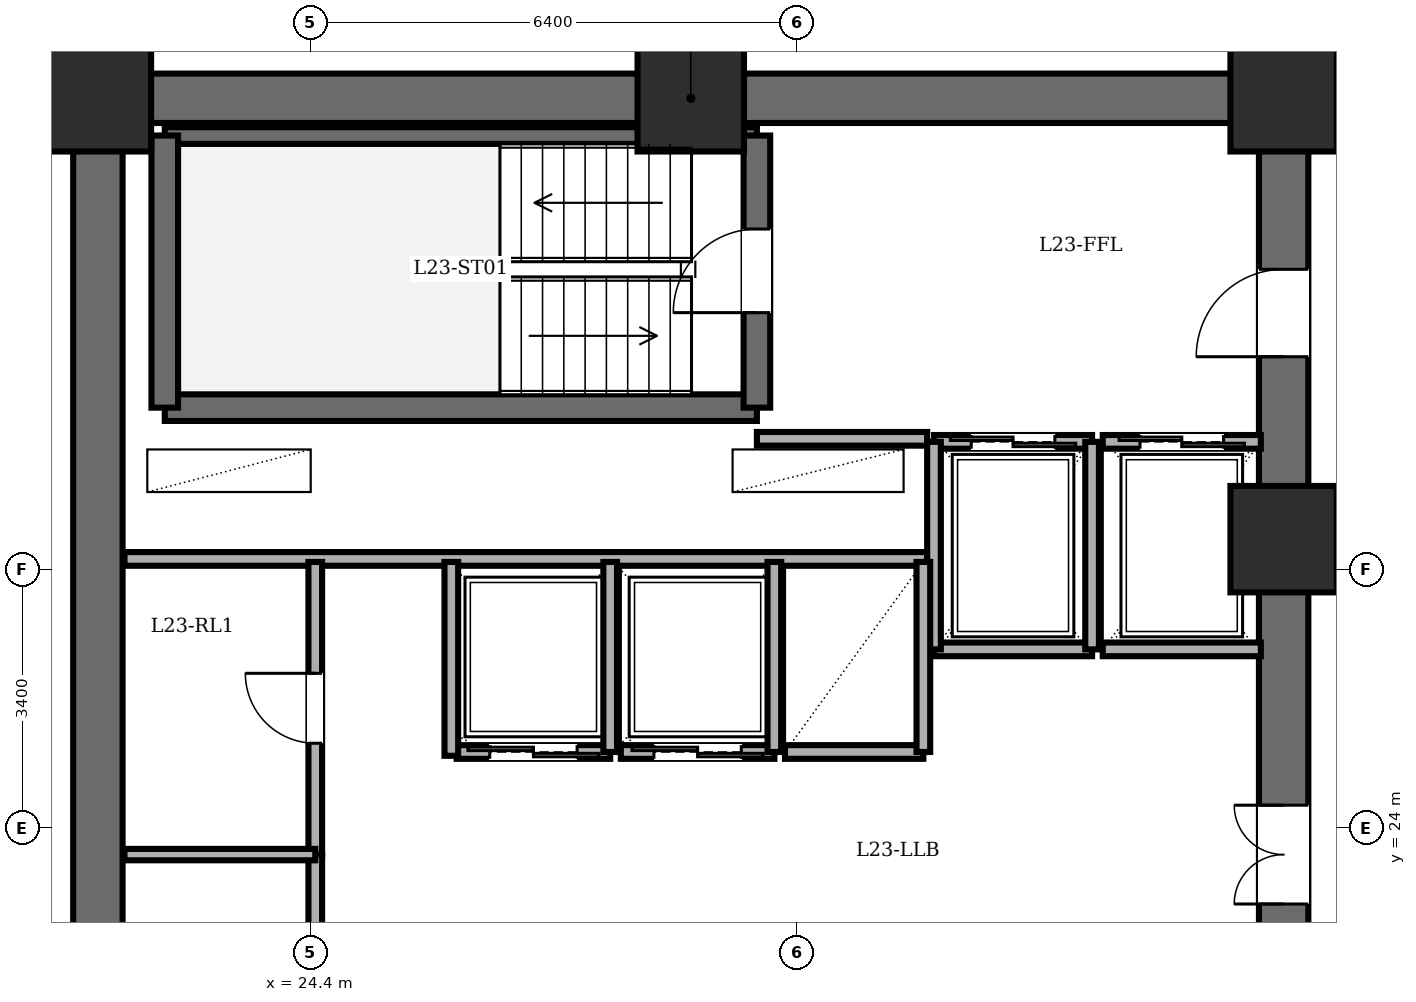
"""IFC4 building model, lengths in metres.
Left out: names, types, materials, properties, quantities, classifications, styles, units other than length and angle.
Written with IfcOpenShell. Run it as: python <this file> out.ifc"""

import sys

from ifc_helpers import new_model, si_unit, direction, frame, frame_2d, origin, origin_2d, place, context, subcontext, project, spatial, rectangle, extrude, element, fill, save


model = new_model("IFC4")
c1 = context("Model", 3, precision=1e-05, world=origin(), true_north=direction((0.0, 1.0)))
c2 = subcontext(c1, "Body", "Model", "MODEL_VIEW")
j1 = project(units=[si_unit("LENGTHUNIT", "METRE"), si_unit("PLANEANGLEUNIT", "RADIAN")], contexts=[c1])
p1 = place(None, origin())
s1 = spatial("IfcSite", under=j1, at=p1, CompositionType="ELEMENT")
p2 = place(p1, origin())
s2 = spatial("IfcBuilding", under=s1, at=p2, CompositionType="ELEMENT")
p3 = place(p2, frame((0.0, 0.0, 89.9)))
s3 = spatial("IfcBuildingStorey", under=s2, at=p3, CompositionType="ELEMENT", Elevation=89.9)
for number, where, z_axis, x_axis in (
    (1, (37.2, 27.8, 0.0), (0.0, 0.0, 1.0), (1.0, 0.0, 0.0)),
    (2, (37.2, 33.6, 0.0), (0.0, 0.0, 1.0), (1.0, 0.0, 0.0)),
    (3, (29.4, 33.6, 0.0), (0.0, 0.0, 1.0), (1.0, 0.0, 0.0)),
    (4, (21.6, 33.6, 0.0), (0.0, 0.0, 1.0), (1.0, 0.0, 0.0)),
):
    element("IfcColumn", number, at=place(p3, frame(where, z_axis=z_axis, x_axis=x_axis)), inside=s3, PredefinedType="COLUMN", context=c2, shape_type="SweptSolid", body=[
        extrude(rectangle(XDim=1.4, YDim=1.4, at=origin_2d()), origin(), (0.0, 0.0, 1.0), 3.6),
    ])
p4 = place(p3, frame((21.6, 14.4, 0.0), z_axis=(0.0, 0.0, 1.0), x_axis=(0.0, 1.0, 0.0)))
e5 = element("IfcWall", 5, at=p4, inside=s3, PredefinedType="SHEAR", context=c2, shape_type="SweptSolid", body=[
    extrude(rectangle(XDim=19.2, YDim=0.65, at=frame_2d((9.6, 0.0))), origin(), (0.0, 0.0, 1.0), 3.4),
])
p5 = place(p3, frame((21.6, 33.6, 0.0), z_axis=(0.0, 0.0, 1.0), x_axis=(1.0, 0.0, 0.0)))
e6 = element("IfcWall", 6, at=p5, inside=s3, PredefinedType="SHEAR", context=c2, shape_type="SweptSolid", body=[
    extrude(rectangle(XDim=15.6, YDim=0.65, at=frame_2d((7.8, 0.0))), origin(), (0.0, 0.0, 1.0), 3.4),
])
p6 = place(p3, frame((37.2, 14.4, 0.0), z_axis=(0.0, 0.0, 1.0), x_axis=(0.0, 1.0, 0.0)))
e7 = element("IfcWall", 7, at=p6, inside=s3, PredefinedType="SHEAR", context=c2, shape_type="SweptSolid", body=[
    extrude(rectangle(XDim=19.2, YDim=0.65, at=frame_2d((9.6, 0.0))), origin(), (0.0, 0.0, 1.0), 3.4),
])
p7 = place(p6, frame((15.8, 0.0, 0.0)))
e8 = element("IfcOpeningElement", 8, at=p7, cuts=e7, PredefinedType="OPENING", context=c2, shape_type="SweptSolid", body=[
    extrude(rectangle(XDim=1.15, YDim=2.15, at=frame_2d((0.575, 1.075))), frame((0.0, 0.335, 0.0), z_axis=(0.0, -1.0, 0.0), x_axis=(1.0, 0.0, 0.0)), (0.0, 0.0, 1.0), 0.67),
])
p8 = place(p6, frame((3.6, 0.0, 0.0)))
e9 = element("IfcOpeningElement", 9, at=p8, cuts=e7, PredefinedType="OPENING", context=c2, shape_type="SweptSolid", body=[
    extrude(rectangle(XDim=1.1, YDim=2.15, at=frame_2d((0.55, 1.075))), frame((0.0, 0.335, 0.0), z_axis=(0.0, -1.0, 0.0), x_axis=(1.0, 0.0, 0.0)), (0.0, 0.0, 1.0), 0.67),
])
p9 = place(p6, frame((8.6, 0.0, 0.0)))
e10 = element("IfcOpeningElement", 10, at=p9, cuts=e7, PredefinedType="OPENING", context=c2, shape_type="SweptSolid", body=[
    extrude(rectangle(XDim=1.3, YDim=2.2, at=frame_2d((0.65, 1.1))), frame((0.0, 0.335, 0.0), z_axis=(0.0, -1.0, 0.0), x_axis=(1.0, 0.0, 0.0)), (0.0, 0.0, 1.0), 0.67),
])
p10 = place(p3, frame((22.48, 29.53, 0.0), z_axis=(0.0, 0.0, 1.0), x_axis=(1.0, 0.0, 0.0)))
e11 = element("IfcWall", 11, at=p10, inside=s3, PredefinedType="SOLIDWALL", context=c2, shape_type="SweptSolid", body=[
    extrude(rectangle(XDim=7.79, YDim=0.35, at=frame_2d((3.895, 0.0))), origin(), (0.0, 0.0, 1.0), 3.4),
])
p11 = place(p3, frame((22.48, 33.11, 0.0), z_axis=(0.0, 0.0, 1.0), x_axis=(1.0, 0.0, 0.0)))
e12 = element("IfcWall", 12, at=p11, inside=s3, PredefinedType="PARTITIONING", context=c2, shape_type="SweptSolid", body=[
    extrude(rectangle(XDim=7.79, YDim=0.22, at=frame_2d((3.895, 0.0))), origin(), (0.0, 0.0, 1.0), 3.4),
])
p12 = place(p3, frame((22.48, 29.53, 0.0), z_axis=(0.0, 0.0, 1.0), x_axis=(0.0, 1.0, 0.0)))
e13 = element("IfcWall", 13, at=p12, inside=s3, PredefinedType="SOLIDWALL", context=c2, shape_type="SweptSolid", body=[
    extrude(rectangle(XDim=3.58, YDim=0.35, at=frame_2d((1.79, 0.0))), origin(), (0.0, 0.0, 1.0), 3.4),
])
p13 = place(p3, frame((30.27, 29.53, 0.0), z_axis=(0.0, 0.0, 1.0), x_axis=(0.0, 1.0, 0.0)))
e14 = element("IfcWall", 14, at=p13, inside=s3, PredefinedType="SOLIDWALL", context=c2, shape_type="SweptSolid", body=[
    extrude(rectangle(XDim=3.58, YDim=0.35, at=frame_2d((1.79, 0.0))), origin(), (0.0, 0.0, 1.0), 3.4),
])
p14 = place(p13, frame((1.25, 0.0, 0.0)))
e15 = element("IfcOpeningElement", 15, at=p14, cuts=e14, PredefinedType="OPENING", context=c2, shape_type="SweptSolid", body=[
    extrude(rectangle(XDim=1.1, YDim=2.15, at=frame_2d((0.55, 1.075))), frame((0.0, 0.185, 0.0), z_axis=(0.0, -1.0, 0.0), x_axis=(1.0, 0.0, 0.0)), (0.0, 0.0, 1.0), 0.37),
])
p15 = place(p3, frame((30.27, 29.12, 0.0), z_axis=(0.0, 0.0, 1.0), x_axis=(1.0, 0.0, 0.0)))
e16 = element("IfcWall", 16, at=p15, inside=s3, PredefinedType="PARTITIONING", context=c2, shape_type="SweptSolid", body=[
    extrude(rectangle(XDim=2.24, YDim=0.18, at=frame_2d((1.12, 0.0))), origin(), (0.0, 0.0, 1.0), 3.4),
])
p16 = place(p3, frame((21.95, 27.54, 0.0), z_axis=(0.0, 0.0, 1.0), x_axis=(1.0, 0.0, 0.0)))
e17 = element("IfcWall", 17, at=p16, inside=s3, PredefinedType="PARTITIONING", context=c2, shape_type="SweptSolid", body=[
    extrude(rectangle(XDim=10.56, YDim=0.18, at=frame_2d((5.28, 0.0))), origin(), (0.0, 0.0, 1.0), 3.4),
])
p17 = place(p3, frame((32.6, 29.08, 0.0), z_axis=(0.0, 0.0, 1.0), x_axis=(1.0, 0.0, 0.0)))
e18 = element("IfcWall", 18, at=p17, inside=s3, PredefinedType="PARTITIONING", context=c2, shape_type="SweptSolid", body=[
    extrude(rectangle(XDim=2.08, YDim=0.18, at=frame_2d((1.04, 0.0))), origin(), (0.0, 0.0, 1.0), 3.4),
])
p18 = place(p17, frame((0.49, 0.0, 0.0)))
e19 = element("IfcOpeningElement", 19, at=p18, cuts=e18, PredefinedType="OPENING", context=c2, shape_type="SweptSolid", body=[
    extrude(rectangle(XDim=1.1, YDim=2.2, at=frame_2d((0.55, 1.1))), frame((0.0, 0.1, 0.0), z_axis=(0.0, -1.0, 0.0), x_axis=(1.0, 0.0, 0.0)), (0.0, 0.0, 1.0), 0.2),
])
p19 = place(p3, frame((34.68, 26.35, 0.0), z_axis=(0.0, 0.0, 1.0), x_axis=(-1.0, 0.0, 0.0)))
e20 = element("IfcWall", 20, at=p19, inside=s3, PredefinedType="PARTITIONING", context=c2, shape_type="SweptSolid", body=[
    extrude(rectangle(XDim=2.08, YDim=0.18, at=frame_2d((1.04, 0.0))), origin(), (0.0, 0.0, 1.0), 3.4),
])
for number, where, z_axis, x_axis in (
    (21, (34.68, 26.35, 0.0), (0.0, 0.0, 1.0), (0.0, 1.0, 0.0)),
    (22, (32.6, 29.08, 0.0), (0.0, 0.0, 1.0), (0.0, -1.0, 0.0)),
):
    element("IfcWall", number, at=place(p3, frame(where, z_axis=z_axis, x_axis=x_axis)), inside=s3, PredefinedType="PARTITIONING", context=c2, shape_type="SweptSolid", body=[
        extrude(rectangle(XDim=2.73, YDim=0.18, at=frame_2d((1.365, 0.0))), origin(), (0.0, 0.0, 1.0), 3.4),
    ])
p20 = place(p3, frame((34.82, 29.08, 0.0), z_axis=(0.0, 0.0, 1.0), x_axis=(1.0, 0.0, 0.0)))
e23 = element("IfcWall", 23, at=p20, inside=s3, PredefinedType="PARTITIONING", context=c2, shape_type="SweptSolid", body=[
    extrude(rectangle(XDim=2.08, YDim=0.18, at=frame_2d((1.04, 0.0))), origin(), (0.0, 0.0, 1.0), 3.4),
])
p21 = place(p20, frame((0.49, 0.0, 0.0)))
e24 = element("IfcOpeningElement", 24, at=p21, cuts=e23, PredefinedType="OPENING", context=c2, shape_type="SweptSolid", body=[
    extrude(rectangle(XDim=1.1, YDim=2.2, at=frame_2d((0.55, 1.1))), frame((0.0, 0.1, 0.0), z_axis=(0.0, -1.0, 0.0), x_axis=(1.0, 0.0, 0.0)), (0.0, 0.0, 1.0), 0.2),
])
p22 = place(p3, frame((36.9, 26.35, 0.0), z_axis=(0.0, 0.0, 1.0), x_axis=(-1.0, 0.0, 0.0)))
e25 = element("IfcWall", 25, at=p22, inside=s3, PredefinedType="PARTITIONING", context=c2, shape_type="SweptSolid", body=[
    extrude(rectangle(XDim=2.08, YDim=0.18, at=frame_2d((1.04, 0.0))), origin(), (0.0, 0.0, 1.0), 3.4),
])
p23 = place(p3, frame((28.34, 25.0, 0.0), z_axis=(0.0, 0.0, 1.0), x_axis=(-1.0, 0.0, 0.0)))
e26 = element("IfcWall", 26, at=p23, inside=s3, PredefinedType="PARTITIONING", context=c2, shape_type="SweptSolid", body=[
    extrude(rectangle(XDim=2.02, YDim=0.18, at=frame_2d((1.01, 0.0))), origin(), (0.0, 0.0, 1.0), 3.4),
])
p24 = place(p23, frame((0.435, 0.0, 0.0)))
e27 = element("IfcOpeningElement", 27, at=p24, cuts=e26, PredefinedType="OPENING", context=c2, shape_type="SweptSolid", body=[
    extrude(rectangle(XDim=1.15, YDim=2.2, at=frame_2d((0.575, 1.1))), frame((0.0, 0.1, 0.0), z_axis=(0.0, -1.0, 0.0), x_axis=(1.0, 0.0, 0.0)), (0.0, 0.0, 1.0), 0.2),
])
p25 = place(p3, frame((28.34, 25.0, 0.0), z_axis=(0.0, 0.0, 1.0), x_axis=(0.0, 1.0, 0.0)))
e28 = element("IfcWall", 28, at=p25, inside=s3, PredefinedType="PARTITIONING", context=c2, shape_type="SweptSolid", body=[
    extrude(rectangle(XDim=2.5, YDim=0.18, at=frame_2d((1.25, 0.0))), origin(), (0.0, 0.0, 1.0), 3.4),
])
p26 = place(p3, frame((30.5, 25.0, 0.0), z_axis=(0.0, 0.0, 1.0), x_axis=(-1.0, 0.0, 0.0)))
e29 = element("IfcWall", 29, at=p26, inside=s3, PredefinedType="PARTITIONING", context=c2, shape_type="SweptSolid", body=[
    extrude(rectangle(XDim=2.02, YDim=0.18, at=frame_2d((1.01, 0.0))), origin(), (0.0, 0.0, 1.0), 3.4),
])
p27 = place(p26, frame((0.435, 0.0, 0.0)))
e30 = element("IfcOpeningElement", 30, at=p27, cuts=e29, PredefinedType="OPENING", context=c2, shape_type="SweptSolid", body=[
    extrude(rectangle(XDim=1.15, YDim=2.2, at=frame_2d((0.575, 1.1))), frame((0.0, 0.1, 0.0), z_axis=(0.0, -1.0, 0.0), x_axis=(1.0, 0.0, 0.0)), (0.0, 0.0, 1.0), 0.2),
])
p28 = place(p3, frame((30.5, 25.0, 0.0), z_axis=(0.0, 0.0, 1.0), x_axis=(0.0, 1.0, 0.0)))
e31 = element("IfcWall", 31, at=p28, inside=s3, PredefinedType="PARTITIONING", context=c2, shape_type="SweptSolid", body=[
    extrude(rectangle(XDim=2.5, YDim=0.18, at=frame_2d((1.25, 0.0))), origin(), (0.0, 0.0, 1.0), 3.4),
])
p29 = place(p3, frame((32.46, 25.0, 0.0), z_axis=(0.0, 0.0, 1.0), x_axis=(-1.0, 0.0, 0.0)))
e32 = element("IfcWall", 32, at=p29, inside=s3, PredefinedType="PARTITIONING", context=c2, shape_type="SweptSolid", body=[
    extrude(rectangle(XDim=1.82, YDim=0.18, at=frame_2d((0.91, 0.0))), origin(), (0.0, 0.0, 1.0), 3.4),
])
p30 = place(p3, frame((32.46, 25.0, 0.0), z_axis=(0.0, 0.0, 1.0), x_axis=(0.0, 1.0, 0.0)))
e33 = element("IfcWall", 33, at=p30, inside=s3, PredefinedType="PARTITIONING", context=c2, shape_type="SweptSolid", body=[
    extrude(rectangle(XDim=2.5, YDim=0.18, at=frame_2d((1.25, 0.0))), origin(), (0.0, 0.0, 1.0), 3.4),
])
p31 = place(p3, frame((24.46, 23.65, 0.0), z_axis=(0.0, 0.0, 1.0), x_axis=(0.0, 1.0, 0.0)))
e34 = element("IfcWall", 34, at=p31, inside=s3, PredefinedType="PARTITIONING", context=c2, shape_type="SweptSolid", body=[
    extrude(rectangle(XDim=3.85, YDim=0.18, at=frame_2d((1.925, 0.0))), origin(), (0.0, 0.0, 1.0), 3.4),
])
p32 = place(p31, frame((1.465, 0.0, 0.0)))
e35 = element("IfcOpeningElement", 35, at=p32, cuts=e34, PredefinedType="OPENING", context=c2, shape_type="SweptSolid", body=[
    extrude(rectangle(XDim=0.92, YDim=2.1, at=frame_2d((0.46, 1.05))), frame((0.0, 0.1, 0.0), z_axis=(0.0, -1.0, 0.0), x_axis=(1.0, 0.0, 0.0)), (0.0, 0.0, 1.0), 0.2),
])
p33 = place(p3, frame((24.46, 19.8, 0.0), z_axis=(0.0, 0.0, 1.0), x_axis=(0.0, 1.0, 0.0)))
e36 = element("IfcWall", 36, at=p33, inside=s3, PredefinedType="PARTITIONING", context=c2, shape_type="SweptSolid", body=[
    extrude(rectangle(XDim=3.85, YDim=0.18, at=frame_2d((1.925, 0.0))), origin(), (0.0, 0.0, 1.0), 3.4),
])
p34 = place(p33, frame((1.465, 0.0, 0.0)))
e37 = element("IfcOpeningElement", 37, at=p34, cuts=e36, PredefinedType="OPENING", context=c2, shape_type="SweptSolid", body=[
    extrude(rectangle(XDim=0.92, YDim=2.1, at=frame_2d((0.46, 1.05))), frame((0.0, 0.1, 0.0), z_axis=(0.0, -1.0, 0.0), x_axis=(1.0, 0.0, 0.0)), (0.0, 0.0, 1.0), 0.2),
])
p35 = place(p3, frame((21.95, 23.65, 0.0), z_axis=(0.0, 0.0, 1.0), x_axis=(1.0, 0.0, 0.0)))
e38 = element("IfcWall", 38, at=p35, inside=s3, PredefinedType="PARTITIONING", context=c2, shape_type="SweptSolid", body=[
    extrude(rectangle(XDim=2.51, YDim=0.15, at=frame_2d((1.255, 0.0))), origin(), (0.0, 0.0, 1.0), 3.4),
])
p36 = place(p3, frame((26.25, 24.95, 0.0), z_axis=(0.0, 0.0, 1.0), x_axis=(0.0, 1.0, 0.0)))
e39 = element("IfcWall", 39, at=p36, inside=s3, PredefinedType="PARTITIONING", context=c2, shape_type="SweptSolid", body=[
    extrude(rectangle(XDim=2.55, YDim=0.18, at=frame_2d((1.275, 0.0))), origin(), (0.0, 0.0, 1.0), 3.4),
])
p37 = place(p3, frame((8.8, 33.82, 0.0), z_axis=(0.0, 0.0, 1.0), x_axis=(1.0, 0.0, 0.0)))
e40 = element("IfcWall", 40, at=p37, inside=s3, PredefinedType="PARTITIONING", context=c2, shape_type="SweptSolid", body=[
    extrude(rectangle(XDim=12.68, YDim=0.22, at=frame_2d((6.34, 0.0))), origin(), (0.0, 0.0, 1.0), 3.4),
])
p38 = place(p37, frame((6.18, 0.0, 0.0)))
e41 = element("IfcOpeningElement", 41, at=p38, cuts=e40, PredefinedType="OPENING", context=c2, shape_type="SweptSolid", body=[
    extrude(rectangle(XDim=1.0, YDim=2.15, at=frame_2d((0.5, 1.075))), frame((0.0, 0.12, 0.0), z_axis=(0.0, -1.0, 0.0), x_axis=(1.0, 0.0, 0.0)), (0.0, 0.0, 1.0), 0.24),
])
p39 = place(p14, origin())
e42 = element("IfcDoor", 42, at=p39, inside=s3, OperationType="SINGLE_SWING_LEFT", PredefinedType="DOOR", context=c2, shape_type="SweptSolid", body=[
    extrude(rectangle(XDim=1.1, YDim=2.15, at=frame_2d((0.55, 1.075))), frame((0.0, 0.025, 0.0), z_axis=(0.0, -1.0, 0.0), x_axis=(1.0, 0.0, 0.0)), (0.0, 0.0, 1.0), 0.05),
])
fill(e15, e42)
p40 = place(p7, origin())
e43 = element("IfcDoor", 43, at=p40, inside=s3, OperationType="SINGLE_SWING_LEFT", PredefinedType="DOOR", context=c2, shape_type="SweptSolid", body=[
    extrude(rectangle(XDim=1.15, YDim=2.15, at=frame_2d((0.575, 1.075))), frame((0.0, 0.025, 0.0), z_axis=(0.0, -1.0, 0.0), x_axis=(1.0, 0.0, 0.0)), (0.0, 0.0, 1.0), 0.05),
])
fill(e8, e43)
p41 = place(p18, origin())
e44 = element("IfcDoor", 44, at=p41, inside=s3, OperationType="DOUBLE_DOOR_SLIDING", PredefinedType="DOOR", context=c2, shape_type="SweptSolid", body=[
    extrude(rectangle(XDim=1.1, YDim=2.2, at=frame_2d((0.55, 1.1))), frame((0.0, 0.025, 0.0), z_axis=(0.0, -1.0, 0.0), x_axis=(1.0, 0.0, 0.0)), (0.0, 0.0, 1.0), 0.05),
])
fill(e19, e44)
p42 = place(p21, origin())
e45 = element("IfcDoor", 45, at=p42, inside=s3, OperationType="DOUBLE_DOOR_SLIDING", PredefinedType="DOOR", context=c2, shape_type="SweptSolid", body=[
    extrude(rectangle(XDim=1.1, YDim=2.2, at=frame_2d((0.55, 1.1))), frame((0.0, 0.025, 0.0), z_axis=(0.0, -1.0, 0.0), x_axis=(1.0, 0.0, 0.0)), (0.0, 0.0, 1.0), 0.05),
])
fill(e24, e45)
p43 = place(p24, origin())
e46 = element("IfcDoor", 46, at=p43, inside=s3, OperationType="DOUBLE_DOOR_SLIDING", PredefinedType="DOOR", context=c2, shape_type="SweptSolid", body=[
    extrude(rectangle(XDim=1.15, YDim=2.2, at=frame_2d((0.575, 1.1))), frame((0.0, 0.025, 0.0), z_axis=(0.0, -1.0, 0.0), x_axis=(1.0, 0.0, 0.0)), (0.0, 0.0, 1.0), 0.05),
])
fill(e27, e46)
p44 = place(p27, origin())
e47 = element("IfcDoor", 47, at=p44, inside=s3, OperationType="DOUBLE_DOOR_SLIDING", PredefinedType="DOOR", context=c2, shape_type="SweptSolid", body=[
    extrude(rectangle(XDim=1.15, YDim=2.2, at=frame_2d((0.575, 1.1))), frame((0.0, 0.025, 0.0), z_axis=(0.0, -1.0, 0.0), x_axis=(1.0, 0.0, 0.0)), (0.0, 0.0, 1.0), 0.05),
])
fill(e30, e47)
p45 = place(p32, origin())
e48 = element("IfcDoor", 48, at=p45, inside=s3, OperationType="SINGLE_SWING_RIGHT", PredefinedType="DOOR", context=c2, shape_type="SweptSolid", body=[
    extrude(rectangle(XDim=0.92, YDim=2.1, at=frame_2d((0.46, 1.05))), frame((0.0, 0.025, 0.0), z_axis=(0.0, -1.0, 0.0), x_axis=(1.0, 0.0, 0.0)), (0.0, 0.0, 1.0), 0.05),
])
fill(e35, e48)
p46 = place(p9, origin())
e49 = element("IfcDoor", 49, at=p46, inside=s3, OperationType="DOUBLE_DOOR_SINGLE_SWING", PredefinedType="DOOR", context=c2, shape_type="SweptSolid", body=[
    extrude(rectangle(XDim=1.3, YDim=2.2, at=frame_2d((0.65, 1.1))), frame((0.0, 0.025, 0.0), z_axis=(0.0, -1.0, 0.0), x_axis=(1.0, 0.0, 0.0)), (0.0, 0.0, 1.0), 0.05),
])
fill(e10, e49)
save(model, sys.argv[1])
